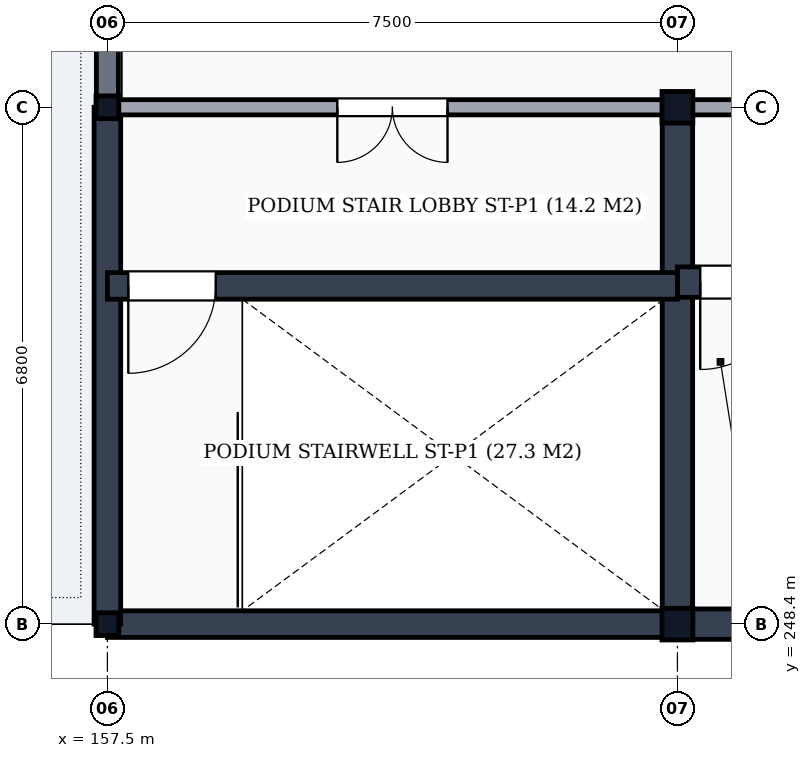
"""IFC4 building model, lengths in metres.
Left out: names, types, materials, properties, quantities, classifications, styles, units other than length and angle.
Written with IfcOpenShell. Run it as: python <this file> out.ifc"""

import sys

from ifc_helpers import new_model, si_unit, direction, frame, frame_2d, origin, origin_2d, place, context, subcontext, project, spatial, rectangle, i_section, extrude, element, fill, save


model = new_model("IFC4")
c1 = context("Model", 3, precision=1e-05, world=origin(), true_north=direction((0.0, 1.0)))
c2 = subcontext(c1, "Body", "Model", "MODEL_VIEW")
j1 = project(units=[si_unit("LENGTHUNIT", "METRE"), si_unit("PLANEANGLEUNIT", "RADIAN")], contexts=[c1])
p1 = place(None, origin())
s1 = spatial("IfcSite", under=j1, at=p1, CompositionType="ELEMENT")
p2 = place(p1, origin())
s2 = spatial("IfcBuilding", under=s1, at=p2, CompositionType="ELEMENT")
p3 = place(p2, frame((0.0, 0.0, 15.6)))
s3 = spatial("IfcBuildingStorey", under=s2, at=p3, CompositionType="ELEMENT", Elevation=15.6)
for number, where, z_axis, x_axis in (
    (1, (157.5, 248.4, 0.0), (0.0, 0.0, 1.0), (1.0, 0.0, 0.0)),
    (2, (157.5, 255.2, 0.0), (0.0, 0.0, 1.0), (1.0, 0.0, 0.0)),
):
    element("IfcColumn", number, at=place(p3, frame(where, z_axis=z_axis, x_axis=x_axis)), inside=s3, PredefinedType="COLUMN", context=c2, shape_type="SweptSolid", body=[
        extrude(i_section(OverallWidth=0.3, OverallDepth=0.3, WebThickness=0.011, FlangeThickness=0.019, FilletRadius=0.027, at=origin_2d()), origin(), (0.0, 0.0, 1.0), 4.8),
    ])
for number, where, z_axis, x_axis in (
    (3, (165.0, 248.4, 0.0), (0.0, 0.0, 1.0), (1.0, 0.0, 0.0)),
    (4, (165.0, 255.2, 0.0), (0.0, 0.0, 1.0), (1.0, 0.0, 0.0)),
):
    element("IfcColumn", number, at=place(p3, frame(where, z_axis=z_axis, x_axis=x_axis)), inside=s3, PredefinedType="COLUMN", context=c2, shape_type="SweptSolid", body=[
        extrude(i_section(OverallWidth=0.406, OverallDepth=0.416, WebThickness=0.03, FlangeThickness=0.048, FilletRadius=0.015, at=origin_2d()), origin(), (0.0, 0.0, 1.0), 4.8),
    ])
p4 = place(p3, frame((157.5, 255.206, 0.0), z_axis=(0.0, 0.0, 1.0), x_axis=(0.0, 1.0, 0.0)))
e5 = element("IfcWall", 5, at=p4, inside=s3, PredefinedType="SOLIDWALL", context=c2, shape_type="SweptSolid", body=[
    extrude(rectangle(XDim=7.588, YDim=0.29, at=frame_2d((3.794, 0.0))), origin(), (0.0, 0.0, 1.0), 4.278),
])
p5 = place(p4, frame((2.994, 0.0, 0.95)))
e6 = element("IfcOpeningElement", 6, at=p5, cuts=e5, PredefinedType="OPENING", context=c2, shape_type="SweptSolid", body=[
    extrude(rectangle(XDim=1.6, YDim=2.4, at=frame_2d((0.8, 1.2))), frame((0.0, 0.16, 0.0), z_axis=(0.0, -1.0, 0.0), x_axis=(1.0, 0.0, 0.0)), (0.0, 0.0, 1.0), 0.32),
])
p6 = place(p3, frame((157.6, 248.5, 4.8), z_axis=(0.0, 0.0, 1.0), x_axis=(1.0, 0.0, 0.0)))
e7 = element("IfcWall", 7, at=p6, inside=s3, PredefinedType="PARAPET", context=c2, shape_type="SweptSolid", body=[
    extrude(rectangle(XDim=7.3, YDim=0.18, at=frame_2d((3.65, 0.0))), origin(), (0.0, 0.0, 1.0), 1.2),
])
p7 = place(p3, frame((157.6, 248.6, 4.8), z_axis=(0.0, 0.0, 1.0), x_axis=(0.0, 1.0, 0.0)))
e8 = element("IfcWall", 8, at=p7, inside=s3, PredefinedType="PARAPET", context=c2, shape_type="SweptSolid", body=[
    extrude(rectangle(XDim=67.2, YDim=0.18, at=frame_2d((33.6, 0.0))), origin(), (0.0, 0.0, 1.0), 1.2),
])
p8 = place(p3, frame((165.0, 248.4, 0.0), z_axis=(0.0, 0.0, 1.0), x_axis=(1.0, 0.0, 0.0)))
e9 = element("IfcWall", 9, at=p8, inside=s3, PredefinedType="SHEAR", context=c2, shape_type="SweptSolid", body=[
    extrude(rectangle(XDim=8.0, YDim=0.4, at=frame_2d((4.0, 0.0))), origin(), (0.0, 0.0, 1.0), 4.48),
])
p9 = place(p3, frame((165.0, 248.4, 0.0), z_axis=(0.0, 0.0, 1.0), x_axis=(0.0, 1.0, 0.0)))
e10 = element("IfcWall", 10, at=p9, inside=s3, PredefinedType="SHEAR", context=c2, shape_type="SweptSolid", body=[
    extrude(rectangle(XDim=6.8, YDim=0.4, at=frame_2d((3.4, 0.0))), origin(), (0.0, 0.0, 1.0), 4.48),
])
p10 = place(p3, frame((165.0, 252.9, 0.0), z_axis=(0.0, 0.0, 1.0), x_axis=(1.0, 0.0, 0.0)))
e11 = element("IfcWall", 11, at=p10, inside=s3, PredefinedType="SHEAR", context=c2, shape_type="SweptSolid", body=[
    extrude(rectangle(XDim=8.0, YDim=0.4, at=frame_2d((4.0, 0.0))), origin(), (0.0, 0.0, 1.0), 4.48),
])
p11 = place(p10, frame((0.3, 0.0, 0.0)))
e12 = element("IfcOpeningElement", 12, at=p11, cuts=e11, PredefinedType="OPENING", context=c2, shape_type="SweptSolid", body=[
    extrude(rectangle(XDim=1.15, YDim=2.15, at=frame_2d((0.575, 1.075))), frame((0.0, 0.215, 0.0), z_axis=(0.0, -1.0, 0.0), x_axis=(1.0, 0.0, 0.0)), (0.0, 0.0, 1.0), 0.43),
])
p12 = place(p3, frame((165.0, 255.2, 0.0), z_axis=(0.0, 0.0, 1.0), x_axis=(1.0, 0.0, 0.0)))
e13 = element("IfcWall", 13, at=p12, inside=s3, PredefinedType="PARTITIONING", context=c2, shape_type="SweptSolid", body=[
    extrude(rectangle(XDim=8.0, YDim=0.2, at=frame_2d((4.0, 0.0))), origin(), (0.0, 0.0, 1.0), 3.928),
])
p13 = place(p12, frame((3.275, 0.0, 0.0)))
e14 = element("IfcOpeningElement", 14, at=p13, cuts=e13, PredefinedType="OPENING", context=c2, shape_type="SweptSolid", body=[
    extrude(rectangle(XDim=1.45, YDim=2.2, at=frame_2d((0.725, 1.1))), frame((0.0, 0.115, 0.0), z_axis=(0.0, -1.0, 0.0), x_axis=(1.0, 0.0, 0.0)), (0.0, 0.0, 1.0), 0.23),
])
p14 = place(p3, frame((157.5, 248.4, 0.0), z_axis=(0.0, 0.0, 1.0), x_axis=(1.0, 0.0, 0.0)))
e15 = element("IfcWall", 15, at=p14, inside=s3, PredefinedType="SHEAR", context=c2, shape_type="SweptSolid", body=[
    extrude(rectangle(XDim=7.5, YDim=0.35, at=frame_2d((3.75, 0.0))), origin(), (0.0, 0.0, 1.0), 4.48),
])
p15 = place(p3, frame((157.5, 248.4, 0.0), z_axis=(0.0, 0.0, 1.0), x_axis=(0.0, 1.0, 0.0)))
e16 = element("IfcWall", 16, at=p15, inside=s3, PredefinedType="SHEAR", context=c2, shape_type="SweptSolid", body=[
    extrude(rectangle(XDim=6.8, YDim=0.35, at=frame_2d((3.4, 0.0))), origin(), (0.0, 0.0, 1.0), 4.48),
])
p16 = place(p3, frame((157.5, 252.85, 0.0), z_axis=(0.0, 0.0, 1.0), x_axis=(1.0, 0.0, 0.0)))
e17 = element("IfcWall", 17, at=p16, inside=s3, PredefinedType="SHEAR", context=c2, shape_type="SweptSolid", body=[
    extrude(rectangle(XDim=7.5, YDim=0.35, at=frame_2d((3.75, 0.0))), origin(), (0.0, 0.0, 1.0), 4.48),
])
p17 = place(p16, frame((0.275, 0.0, 0.0)))
e18 = element("IfcOpeningElement", 18, at=p17, cuts=e17, PredefinedType="OPENING", context=c2, shape_type="SweptSolid", body=[
    extrude(rectangle(XDim=1.15, YDim=2.15, at=frame_2d((0.575, 1.075))), frame((0.0, 0.19, 0.0), z_axis=(0.0, -1.0, 0.0), x_axis=(1.0, 0.0, 0.0)), (0.0, 0.0, 1.0), 0.38),
])
p18 = place(p3, frame((157.5, 255.2, 0.0), z_axis=(0.0, 0.0, 1.0), x_axis=(1.0, 0.0, 0.0)))
e19 = element("IfcWall", 19, at=p18, inside=s3, PredefinedType="PARTITIONING", context=c2, shape_type="SweptSolid", body=[
    extrude(rectangle(XDim=7.5, YDim=0.2, at=frame_2d((3.75, 0.0))), origin(), (0.0, 0.0, 1.0), 3.928),
])
p19 = place(p18, frame((3.025, 0.0, 0.0)))
e20 = element("IfcOpeningElement", 20, at=p19, cuts=e19, PredefinedType="OPENING", context=c2, shape_type="SweptSolid", body=[
    extrude(rectangle(XDim=1.45, YDim=2.2, at=frame_2d((0.725, 1.1))), frame((0.0, 0.115, 0.0), z_axis=(0.0, -1.0, 0.0), x_axis=(1.0, 0.0, 0.0)), (0.0, 0.0, 1.0), 0.23),
])
p20 = place(p11, frame((1.15, 0.0, 0.0), z_axis=(0.0, 0.0, 1.0), x_axis=(-1.0, 0.0, 0.0)))
e21 = element("IfcDoor", 21, at=p20, inside=s3, OperationType="SINGLE_SWING_RIGHT", PredefinedType="DOOR", context=c2, shape_type="SweptSolid", body=[
    extrude(rectangle(XDim=1.15, YDim=2.15, at=frame_2d((0.575, 1.075))), frame((0.0, 0.025, 0.0), z_axis=(0.0, -1.0, 0.0), x_axis=(1.0, 0.0, 0.0)), (0.0, 0.0, 1.0), 0.05),
])
fill(e12, e21)
p21 = place(p17, frame((1.15, 0.0, 0.0), z_axis=(0.0, 0.0, 1.0), x_axis=(-1.0, 0.0, 0.0)))
e22 = element("IfcDoor", 22, at=p21, inside=s3, OperationType="SINGLE_SWING_RIGHT", PredefinedType="DOOR", context=c2, shape_type="SweptSolid", body=[
    extrude(rectangle(XDim=1.15, YDim=2.15, at=frame_2d((0.575, 1.075))), frame((0.0, 0.025, 0.0), z_axis=(0.0, -1.0, 0.0), x_axis=(1.0, 0.0, 0.0)), (0.0, 0.0, 1.0), 0.05),
])
fill(e18, e22)
p22 = place(p19, frame((1.45, 0.0, 0.0), z_axis=(0.0, 0.0, 1.0), x_axis=(-1.0, 0.0, 0.0)))
e23 = element("IfcDoor", 23, at=p22, inside=s3, OperationType="DOUBLE_DOOR_SINGLE_SWING", PredefinedType="DOOR", context=c2, shape_type="SweptSolid", body=[
    extrude(rectangle(XDim=1.45, YDim=2.2, at=frame_2d((0.725, 1.1))), frame((0.0, 0.025, 0.0), z_axis=(0.0, -1.0, 0.0), x_axis=(1.0, 0.0, 0.0)), (0.0, 0.0, 1.0), 0.05),
])
fill(e20, e23)
save(model, sys.argv[1])
